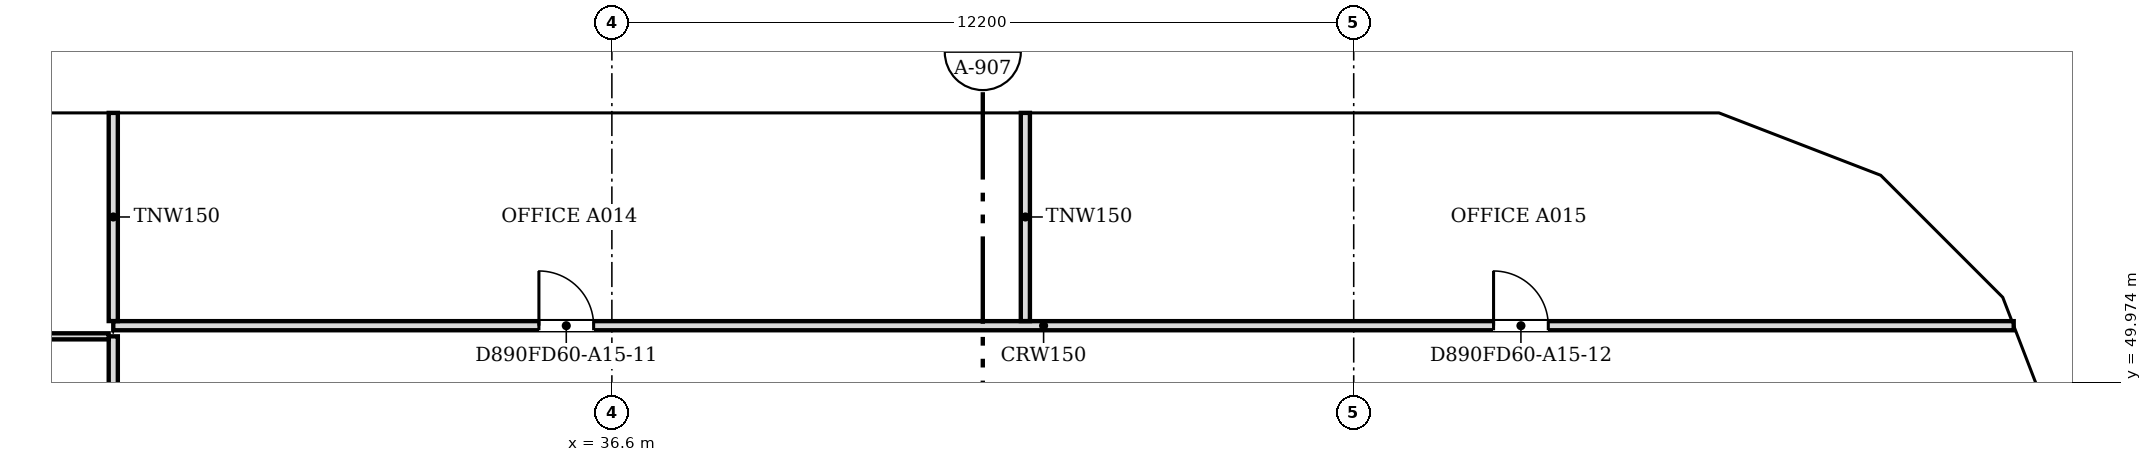
"""IFC4 building model, lengths in metres.
Left out: names, types, materials, properties, quantities, classifications, styles, units other than length and angle.
Written with IfcOpenShell. Run it as: python <this file> out.ifc"""

import sys

from ifc_helpers import new_model, si_unit, direction, frame, frame_2d, origin, place, context, subcontext, project, spatial, polyline, rectangle, outline, extrude, faceted_brep, source, transform, mapped, element, fill, save


model = new_model("IFC4")
c1 = context("Model", 3, precision=1e-05, world=origin(), true_north=direction((0.0, 1.0)))
c2 = subcontext(c1, "Body", "Model", "MODEL_VIEW")
j1 = project(units=[si_unit("LENGTHUNIT", "METRE"), si_unit("PLANEANGLEUNIT", "RADIAN")], contexts=[c1])
p1 = place(None, origin())
s1 = spatial("IfcSite", under=j1, at=p1, CompositionType="ELEMENT")
p2 = place(p1, origin())
s2 = spatial("IfcBuilding", under=s1, at=p2, CompositionType="ELEMENT")
p3 = place(p2, frame((0.0, 0.0, 170.6)))
s3 = spatial("IfcBuildingStorey", under=s2, at=p3, CompositionType="ELEMENT", Elevation=170.6)
m1 = source(origin(), c2, "Body", "Brep", [
    faceted_brep([(2.95, -0.25, 0.0), (3.003, -0.25, 0.068), (3.003, -0.25, 7.531), (2.95, -0.25, 7.6), (0.0, -0.25, 3.8), (0.047, 0.25, 3.86), (2.898, 0.25, 7.532), (2.898, 0.25, 0.068), (0.047, 0.25, 3.74), (2.95, 0.0, 0.0), (2.95, 0.0, 7.6), (0.0, 0.0, 3.8)], [[[0, 1, 2, 3, 4]], [[5, 6, 7, 8]], [[1, 0, 9]], [[10, 3, 2]], [[6, 5, 11, 4, 3, 10]], [[8, 7, 9, 0, 4, 11]], [[8, 11, 5]], [[1, 9, 7, 6, 10, 2]]]),
])
p4 = place(p3, frame((60.75, 48.753, -3.8), z_axis=(0.0, 0.0, 1.0), x_axis=(-0.35992665181, 0.932980602862, 0.0)))
e1 = element("IfcWall", 1, at=p4, inside=s3, PredefinedType="SOLIDWALL", context=c2, shape_type="MappedRepresentation", body=[
    mapped(m1, transform((0.0, 0.0, 0.0), scale=1.0)),
])
m2 = source(origin(), c2, "Body", "SweptSolid", [
    extrude(outline(polyline([(2.75, 6.935), (0.316, 3.8), (2.75, 0.665), (2.75, 6.935)])), frame((0.0, 0.26, 0.0), z_axis=(0.0, -1.0, 0.0), x_axis=(1.0, 0.0, 0.0)), (0.0, 0.0, 1.0), 0.52),
])
p5 = place(p4, origin())
e2 = element("IfcOpeningElement", 2, at=p5, cuts=e1, PredefinedType="OPENING", context=c2, shape_type="MappedRepresentation", body=[
    mapped(m2, transform((0.0, 0.0, 0.0), scale=1.0)),
])
m3 = source(origin(), c2, "Body", "Brep", [
    faceted_brep([(0.053, -0.25, 0.0), (2.997, -0.25, 3.8), (0.053, -0.25, 7.6), (0.0, -0.25, 7.532), (0.0, -0.25, 0.068), (0.106, 0.25, 7.531), (2.944, 0.25, 3.868), (2.944, 0.25, 3.732), (0.106, 0.25, 0.068), (2.997, 0.0, 3.8), (0.053, 0.0, 0.0), (0.053, 0.0, 7.6)], [[[0, 1, 2, 3, 4]], [[5, 6, 7, 8]], [[8, 7, 9, 1, 0, 10]], [[6, 5, 11, 2, 1, 9]], [[3, 2, 11]], [[10, 0, 4]], [[8, 10, 4, 3, 11, 5]], [[7, 6, 9]]]),
])
p6 = place(p3, frame((59.726, 51.469, -3.8), z_axis=(0.0, 0.0, 1.0), x_axis=(-0.707106781187, 0.707106781187, 0.0)))
e3 = element("IfcWall", 3, at=p6, inside=s3, PredefinedType="SOLIDWALL", context=c2, shape_type="MappedRepresentation", body=[
    mapped(m3, transform((0.0, 0.0, 0.0), scale=1.0)),
])
m4 = source(origin(), c2, "Body", "SweptSolid", [
    extrude(outline(polyline([(0.253, 0.666), (2.681, 3.8), (0.253, 6.934), (0.253, 0.666)])), frame((0.0, 0.26, 0.0), z_axis=(0.0, -1.0, 0.0), x_axis=(1.0, 0.0, 0.0)), (0.0, 0.0, 1.0), 0.52),
])
p7 = place(p6, origin())
e4 = element("IfcOpeningElement", 4, at=p7, cuts=e3, PredefinedType="OPENING", context=c2, shape_type="MappedRepresentation", body=[
    mapped(m4, transform((0.0, 0.0, 0.0), scale=1.0)),
])
m5 = source(origin(), c2, "Body", "Brep", [
    faceted_brep([(2.95, -0.25, 0.0), (2.997, -0.25, 0.059), (2.997, -0.25, 7.541), (2.95, -0.25, 7.6), (0.0, -0.25, 3.8), (0.053, 0.25, 3.868), (2.904, 0.25, 7.54), (2.904, 0.25, 0.06), (0.053, 0.25, 3.732), (2.95, 0.0, 0.0), (2.95, 0.0, 7.6), (0.0, 0.0, 3.8)], [[[0, 1, 2, 3, 4]], [[5, 6, 7, 8]], [[1, 0, 9]], [[10, 3, 2]], [[6, 5, 11, 4, 3, 10]], [[8, 7, 9, 0, 4, 11]], [[8, 11, 5]], [[1, 9, 7, 6, 10, 2]]]),
])
p8 = place(p3, frame((57.606, 53.588, -3.8), z_axis=(0.0, 0.0, 1.0), x_axis=(-0.932990326376, 0.359901446078, 0.0)))
e5 = element("IfcWall", 5, at=p8, inside=s3, PredefinedType="SOLIDWALL", context=c2, shape_type="MappedRepresentation", body=[
    mapped(m5, transform((0.0, 0.0, 0.0), scale=1.0)),
])
p9 = place(p8, origin())
e6 = element("IfcOpeningElement", 6, at=p9, cuts=e5, PredefinedType="OPENING", context=c2, shape_type="MappedRepresentation", body=[
    mapped(m2, transform((0.0, 0.0, 0.0), scale=1.0)),
])
m6 = source(origin(), c2, "Body", "Brep", [
    faceted_brep([(0.047, -0.25, 0.0), (3.05, -0.25, 3.8), (0.047, -0.25, 7.6), (0.0, -0.25, 7.54), (0.0, -0.25, 0.06), (0.093, 0.25, 7.541), (3.05, 0.25, 3.8), (0.093, 0.25, 0.059), (0.047, 0.0, 0.0), (0.047, 0.0, 7.6)], [[[0, 1, 2, 3, 4]], [[5, 6, 7]], [[7, 6, 1, 0, 8]], [[6, 5, 9, 2, 1]], [[3, 2, 9]], [[8, 0, 4]], [[7, 8, 4, 3, 9, 5]]]),
])
p10 = place(p3, frame((54.9, 54.65, -3.8), z_axis=(0.0, 0.0, 1.0), x_axis=(-1.0, 0.0, 0.0)))
e7 = element("IfcWall", 7, at=p10, inside=s3, PredefinedType="SOLIDWALL", context=c2, shape_type="MappedRepresentation", body=[
    mapped(m6, transform((0.0, 0.0, 0.0), scale=1.0)),
])
m7 = source(origin(), c2, "Body", "SweptSolid", [
    extrude(outline(polyline([(0.247, 0.656), (2.731, 3.8), (0.247, 6.944), (0.247, 0.656)])), frame((0.0, 0.26, 0.0), z_axis=(0.0, -1.0, 0.0), x_axis=(1.0, 0.0, 0.0)), (0.0, 0.0, 1.0), 0.52),
])
p11 = place(p10, origin())
e8 = element("IfcOpeningElement", 8, at=p11, cuts=e7, PredefinedType="OPENING", context=c2, shape_type="MappedRepresentation", body=[
    mapped(m7, transform((0.0, 0.0, 0.0), scale=1.0)),
])
m8 = source(origin(), c2, "Body", "SweptSolid", [
    extrude(outline(polyline([(3.05, 0.0), (6.1, 3.8), (3.05, 7.6), (0.0, 3.8), (3.05, 0.0)])), frame((0.0, 0.25, 0.0), z_axis=(0.0, -1.0, 0.0), x_axis=(1.0, 0.0, 0.0)), (0.0, 0.0, 1.0), 0.5),
])
p12 = place(p3, frame((51.85, 54.65, -3.8), z_axis=(0.0, 0.0, 1.0), x_axis=(-1.0, 0.0, 0.0)))
e9 = element("IfcWall", 9, at=p12, inside=s3, PredefinedType="SOLIDWALL", context=c2, shape_type="MappedRepresentation", body=[
    mapped(m8, transform((0.0, 0.0, 0.0), scale=1.0)),
])
m9 = source(origin(), c2, "Body", "SweptSolid", [
    extrude(outline(polyline([(3.05, 0.399), (5.78, 3.8), (3.05, 7.2), (0.321, 3.8), (3.05, 0.399)])), frame((0.0, 0.26, 0.0), z_axis=(0.0, -1.0, 0.0), x_axis=(1.0, 0.0, 0.0)), (0.0, 0.0, 1.0), 0.52),
])
p13 = place(p12, origin())
e10 = element("IfcOpeningElement", 10, at=p13, cuts=e9, PredefinedType="OPENING", context=c2, shape_type="MappedRepresentation", body=[
    mapped(m9, transform((0.0, 0.0, 0.0), scale=1.0)),
])
p14 = place(p3, frame((45.75, 54.65, -3.8), z_axis=(0.0, 0.0, 1.0), x_axis=(-1.0, 0.0, 0.0)))
e11 = element("IfcWall", 11, at=p14, inside=s3, PredefinedType="SOLIDWALL", context=c2, shape_type="MappedRepresentation", body=[
    mapped(m8, transform((0.0, 0.0, 0.0), scale=1.0)),
])
p15 = place(p14, origin())
e12 = element("IfcOpeningElement", 12, at=p15, cuts=e11, PredefinedType="OPENING", context=c2, shape_type="MappedRepresentation", body=[
    mapped(m9, transform((0.0, 0.0, 0.0), scale=1.0)),
])
m10 = source(origin(), c2, "Body", "Brep", [
    faceted_brep([(3.05, -0.25, 0.0), (6.1, -0.25, 3.8), (6.1, -0.25, 3.8), (3.05, -0.25, 7.6), (0.0, -0.25, 3.8), (0.0, 0.25, 3.8), (3.05, 0.25, 7.6), (6.1, 0.25, 3.8), (6.1, 0.25, 3.8), (3.05, 0.25, 0.0)], [[[0, 1, 2, 3, 4]], [[5, 6, 7, 8, 9]], [[9, 8, 1, 0]], [[7, 6, 3, 2]], [[6, 5, 4, 3]], [[5, 9, 0, 4]], [[1, 8, 7, 2]]]),
])
p16 = place(p3, frame((39.65, 54.65, -3.8), z_axis=(0.0, 0.0, 1.0), x_axis=(-1.0, 0.0, 0.0)))
e13 = element("IfcWall", 13, at=p16, inside=s3, PredefinedType="SOLIDWALL", context=c2, shape_type="MappedRepresentation", body=[
    mapped(m10, transform((0.0, 0.0, 0.0), scale=1.0)),
])
p17 = place(p16, origin())
e14 = element("IfcOpeningElement", 14, at=p17, cuts=e13, PredefinedType="OPENING", context=c2, shape_type="MappedRepresentation", body=[
    mapped(m9, transform((0.0, 0.0, 0.0), scale=1.0)),
])
p18 = place(p3, frame((33.55, 54.65, -3.8), z_axis=(0.0, 0.0, 1.0), x_axis=(-1.0, 0.0, 0.0)))
e15 = element("IfcWall", 15, at=p18, inside=s3, PredefinedType="SOLIDWALL", context=c2, shape_type="MappedRepresentation", body=[
    mapped(m8, transform((0.0, 0.0, 0.0), scale=1.0)),
])
p19 = place(p18, origin())
e16 = element("IfcOpeningElement", 16, at=p19, cuts=e15, PredefinedType="OPENING", context=c2, shape_type="MappedRepresentation", body=[
    mapped(m9, transform((0.0, 0.0, 0.0), scale=1.0)),
])
p20 = place(p3, frame((27.45, 54.65, -3.8), z_axis=(0.0, 0.0, 1.0), x_axis=(-1.0, 0.0, 0.0)))
e17 = element("IfcWall", 17, at=p20, inside=s3, PredefinedType="SOLIDWALL", context=c2, shape_type="MappedRepresentation", body=[
    mapped(m10, transform((0.0, 0.0, 0.0), scale=1.0)),
])
p21 = place(p20, origin())
e18 = element("IfcOpeningElement", 18, at=p21, cuts=e17, PredefinedType="OPENING", context=c2, shape_type="MappedRepresentation", body=[
    mapped(m9, transform((0.0, 0.0, 0.0), scale=1.0)),
])
p22 = place(p2, frame((0.0, 0.0, 174.4)))
s4 = spatial("IfcBuildingStorey", under=s2, at=p22, CompositionType="ELEMENT", Elevation=174.4)
m11 = source(origin(), c2, "Body", "Brep", [
    faceted_brep([(0.047, -0.25, 0.0), (2.997, -0.25, 3.8), (0.047, -0.25, 7.6), (0.0, -0.25, 7.541), (0.0, -0.25, 0.059), (0.093, 0.25, 7.54), (2.944, 0.25, 3.868), (2.944, 0.25, 3.732), (0.093, 0.25, 0.06), (2.997, 0.0, 3.8), (0.047, 0.0, 0.0), (0.047, 0.0, 7.6)], [[[0, 1, 2, 3, 4]], [[5, 6, 7, 8]], [[8, 7, 9, 1, 0, 10]], [[6, 5, 11, 2, 1, 9]], [[3, 2, 11]], [[10, 0, 4]], [[8, 10, 4, 3, 11, 5]], [[9, 7, 6]]]),
])
p23 = place(p22, frame((60.767, 48.71, -3.8), z_axis=(0.0, 0.0, 1.0), x_axis=(-0.359901446078, 0.932990326376, 0.0)))
e19 = element("IfcWall", 19, at=p23, inside=s4, PredefinedType="SOLIDWALL", context=c2, shape_type="MappedRepresentation", body=[
    mapped(m11, transform((0.0, 0.0, 0.0), scale=1.0)),
])
m12 = source(origin(), c2, "Body", "SweptSolid", [
    extrude(outline(polyline([(0.247, 0.665), (2.681, 3.8), (0.247, 6.935), (0.247, 0.665)])), frame((0.0, 0.26, 0.0), z_axis=(0.0, -1.0, 0.0), x_axis=(1.0, 0.0, 0.0)), (0.0, 0.0, 1.0), 0.52),
])
p24 = place(p23, origin())
e20 = element("IfcOpeningElement", 20, at=p24, cuts=e19, PredefinedType="OPENING", context=c2, shape_type="MappedRepresentation", body=[
    mapped(m12, transform((0.0, 0.0, 0.0), scale=1.0)),
])
m13 = source(origin(), c2, "Body", "Brep", [
    faceted_brep([(2.944, -0.25, 0.0), (2.997, -0.25, 0.068), (2.997, -0.25, 7.532), (2.944, -0.25, 7.6), (0.0, -0.25, 3.8), (0.053, 0.25, 3.868), (2.891, 0.25, 7.532), (2.891, 0.25, 0.068), (0.053, 0.25, 3.731), (2.944, 0.0, 0.0), (2.944, 0.0, 7.6), (0.0, 0.0, 3.8)], [[[0, 1, 2, 3, 4]], [[5, 6, 7, 8]], [[1, 0, 9]], [[10, 3, 2]], [[6, 5, 11, 4, 3, 10]], [[8, 7, 9, 0, 4, 11]], [[8, 11, 5]], [[1, 9, 7, 6, 10, 2]]]),
])
p25 = place(p22, frame((59.688, 51.506, -3.8), z_axis=(0.0, 0.0, 1.0), x_axis=(-0.707106781187, 0.707106781187, 0.0)))
e21 = element("IfcWall", 21, at=p25, inside=s4, PredefinedType="SOLIDWALL", context=c2, shape_type="MappedRepresentation", body=[
    mapped(m13, transform((0.0, 0.0, 0.0), scale=1.0)),
])
m14 = source(origin(), c2, "Body", "SweptSolid", [
    extrude(outline(polyline([(2.744, 6.934), (0.316, 3.8), (2.744, 0.666), (2.744, 6.934)])), frame((0.0, 0.26, 0.0), z_axis=(0.0, -1.0, 0.0), x_axis=(1.0, 0.0, 0.0)), (0.0, 0.0, 1.0), 0.52),
])
p26 = place(p25, origin())
e22 = element("IfcOpeningElement", 22, at=p26, cuts=e21, PredefinedType="OPENING", context=c2, shape_type="MappedRepresentation", body=[
    mapped(m14, transform((0.0, 0.0, 0.0), scale=1.0)),
])
m15 = source(origin(), c2, "Body", "Brep", [
    faceted_brep([(0.053, -0.25, 0.0), (3.003, -0.25, 3.8), (0.053, -0.25, 7.6), (0.0, -0.25, 7.531), (0.0, -0.25, 0.068), (0.106, 0.25, 7.532), (2.957, 0.25, 3.86), (2.957, 0.25, 3.74), (0.106, 0.25, 0.068), (3.003, 0.0, 3.8), (0.053, 0.0, 0.0), (0.053, 0.0, 7.6)], [[[0, 1, 2, 3, 4]], [[5, 6, 7, 8]], [[8, 7, 9, 1, 0, 10]], [[6, 5, 11, 2, 1, 9]], [[3, 2, 11]], [[10, 0, 4]], [[8, 10, 4, 3, 11, 5]], [[9, 7, 6]]]),
])
p27 = place(p22, frame((57.656, 53.569, -3.8), z_axis=(0.0, 0.0, 1.0), x_axis=(-0.933007896601, 0.359855894603, 0.0)))
e23 = element("IfcWall", 23, at=p27, inside=s4, PredefinedType="SOLIDWALL", context=c2, shape_type="MappedRepresentation", body=[
    mapped(m15, transform((0.0, 0.0, 0.0), scale=1.0)),
])
m16 = source(origin(), c2, "Body", "SweptSolid", [
    extrude(outline(polyline([(0.253, 0.665), (2.687, 3.8), (0.253, 6.935), (0.253, 0.665)])), frame((0.0, 0.26, 0.0), z_axis=(0.0, -1.0, 0.0), x_axis=(1.0, 0.0, 0.0)), (0.0, 0.0, 1.0), 0.52),
])
p28 = place(p27, origin())
e24 = element("IfcOpeningElement", 24, at=p28, cuts=e23, PredefinedType="OPENING", context=c2, shape_type="MappedRepresentation", body=[
    mapped(m16, transform((0.0, 0.0, 0.0), scale=1.0)),
])
m17 = source(origin(), c2, "Body", "Brep", [
    faceted_brep([(3.003, -0.25, 0.0), (6.053, -0.25, 3.8), (3.003, -0.25, 7.6), (0.0, -0.25, 3.8), (0.047, 0.25, 3.859), (3.003, 0.25, 7.6), (6.053, 0.25, 3.8), (3.003, 0.25, 0.0), (0.047, 0.25, 3.741), (0.0, 0.0, 3.8)], [[[0, 1, 2, 3]], [[4, 5, 6, 7, 8]], [[7, 6, 1, 0]], [[6, 5, 2, 1]], [[5, 4, 9, 3, 2]], [[8, 7, 0, 3, 9]], [[8, 9, 4]]]),
])
p29 = place(p22, frame((54.854, 54.65, -3.8), z_axis=(0.0, 0.0, 1.0), x_axis=(-1.0, 0.0, 0.0)))
e25 = element("IfcWall", 25, at=p29, inside=s4, PredefinedType="SOLIDWALL", context=c2, shape_type="MappedRepresentation", body=[
    mapped(m17, transform((0.0, 0.0, 0.0), scale=1.0)),
])
m18 = source(origin(), c2, "Body", "SweptSolid", [
    extrude(outline(polyline([(3.005, 0.401), (5.733, 3.8), (3.005, 7.199), (0.319, 3.8), (3.005, 0.401)])), frame((0.0, 0.26, 0.0), z_axis=(0.0, -1.0, 0.0), x_axis=(1.0, 0.0, 0.0)), (0.0, 0.0, 1.0), 0.52),
])
p30 = place(p29, origin())
e26 = element("IfcOpeningElement", 26, at=p30, cuts=e25, PredefinedType="OPENING", context=c2, shape_type="MappedRepresentation", body=[
    mapped(m18, transform((0.0, 0.0, 0.0), scale=1.0)),
])
m19 = source(origin(), c2, "Body", "SweptSolid", [
    extrude(outline(polyline([(3.05, 0.0), (6.1, 3.8), (3.05, 7.6), (0.0, 3.8), (3.05, 0.0)])), frame((0.0, 0.25, 0.0), z_axis=(0.0, -1.0, 0.0), x_axis=(1.0, 0.0, 0.0)), (0.0, 0.0, 1.0), 0.5),
])
p31 = place(p22, frame((48.8, 54.65, -3.8), z_axis=(0.0, 0.0, 1.0), x_axis=(-1.0, 0.0, 0.0)))
e27 = element("IfcWall", 27, at=p31, inside=s4, PredefinedType="SOLIDWALL", context=c2, shape_type="MappedRepresentation", body=[
    mapped(m19, transform((0.0, 0.0, 0.0), scale=1.0)),
])
m20 = source(origin(), c2, "Body", "SweptSolid", [
    extrude(outline(polyline([(3.05, 0.399), (5.78, 3.8), (3.05, 7.2), (0.321, 3.8), (3.05, 0.399)])), frame((0.0, 0.26, 0.0), z_axis=(0.0, -1.0, 0.0), x_axis=(1.0, 0.0, 0.0)), (0.0, 0.0, 1.0), 0.52),
])
p32 = place(p31, origin())
e28 = element("IfcOpeningElement", 28, at=p32, cuts=e27, PredefinedType="OPENING", context=c2, shape_type="MappedRepresentation", body=[
    mapped(m20, transform((0.0, 0.0, 0.0), scale=1.0)),
])
m21 = source(origin(), c2, "Body", "Brep", [
    faceted_brep([(3.05, -0.25, 0.0), (6.1, -0.25, 3.8), (6.1, -0.25, 3.8), (3.05, -0.25, 7.6), (0.0, -0.25, 3.8), (0.0, 0.25, 3.8), (3.05, 0.25, 7.6), (6.1, 0.25, 3.8), (6.1, 0.25, 3.8), (3.05, 0.25, 0.0)], [[[0, 1, 2, 3, 4]], [[5, 6, 7, 8, 9]], [[9, 8, 1, 0]], [[7, 6, 3, 2]], [[6, 5, 4, 3]], [[5, 9, 0, 4]], [[1, 8, 7, 2]]]),
])
p33 = place(p22, frame((42.7, 54.65, -3.8), z_axis=(0.0, 0.0, 1.0), x_axis=(-1.0, 0.0, 0.0)))
e29 = element("IfcWall", 29, at=p33, inside=s4, PredefinedType="SOLIDWALL", context=c2, shape_type="MappedRepresentation", body=[
    mapped(m21, transform((0.0, 0.0, 0.0), scale=1.0)),
])
p34 = place(p33, origin())
e30 = element("IfcOpeningElement", 30, at=p34, cuts=e29, PredefinedType="OPENING", context=c2, shape_type="MappedRepresentation", body=[
    mapped(m20, transform((0.0, 0.0, 0.0), scale=1.0)),
])
p35 = place(p22, frame((36.6, 54.65, -3.8), z_axis=(0.0, 0.0, 1.0), x_axis=(-1.0, 0.0, 0.0)))
e31 = element("IfcWall", 31, at=p35, inside=s4, PredefinedType="SOLIDWALL", context=c2, shape_type="MappedRepresentation", body=[
    mapped(m19, transform((0.0, 0.0, 0.0), scale=1.0)),
])
p36 = place(p35, origin())
e32 = element("IfcOpeningElement", 32, at=p36, cuts=e31, PredefinedType="OPENING", context=c2, shape_type="MappedRepresentation", body=[
    mapped(m20, transform((0.0, 0.0, 0.0), scale=1.0)),
])
p37 = place(p22, frame((30.5, 54.65, -3.8), z_axis=(0.0, 0.0, 1.0), x_axis=(-1.0, 0.0, 0.0)))
e33 = element("IfcWall", 33, at=p37, inside=s4, PredefinedType="SOLIDWALL", context=c2, shape_type="MappedRepresentation", body=[
    mapped(m19, transform((0.0, 0.0, 0.0), scale=1.0)),
])
p38 = place(p37, origin())
e34 = element("IfcOpeningElement", 34, at=p38, cuts=e33, PredefinedType="OPENING", context=c2, shape_type="MappedRepresentation", body=[
    mapped(m20, transform((0.0, 0.0, 0.0), scale=1.0)),
])
p39 = place(p3, frame((28.4, 48.176, 0.0), z_axis=(0.0, 0.0, 1.0), x_axis=(0.0, 1.0, 0.0)))
e35 = element("IfcWall", 35, at=p39, inside=s3, PredefinedType="PARTITIONING", context=c2, shape_type="SweptSolid", body=[
    extrude(rectangle(XDim=2.549, YDim=0.15, at=frame_2d((1.274, 0.0))), origin(), (0.0, 0.0, 1.0), 3.067),
])
p40 = place(p3, frame((19.776, 50.725, 0.0), z_axis=(0.0, 0.0, 1.0), x_axis=(1.0, 0.0, 0.0)))
e36 = element("IfcWall", 36, at=p40, inside=s3, PredefinedType="PARTITIONING", context=c2, shape_type="SweptSolid", body=[
    extrude(rectangle(XDim=8.548, YDim=0.1, at=frame_2d((4.274, 0.0))), origin(), (0.0, 0.0, 1.0), 3.067),
])
m22 = source(origin(), c2, "Body", "SweptSolid", [
    extrude(rectangle(XDim=0.9, YDim=2.1, at=frame_2d((0.45, 1.05))), frame((0.0, 0.06, 0.0), z_axis=(0.0, -1.0, 0.0), x_axis=(1.0, 0.0, 0.0)), (0.0, 0.0, 1.0), 0.12),
])
p41 = place(p40, frame((1.6, 0.0, 0.0)))
e37 = element("IfcOpeningElement", 37, at=p41, cuts=e36, PredefinedType="OPENING", context=c2, shape_type="MappedRepresentation", body=[
    mapped(m22, transform((0.0, 0.0, 0.0), scale=1.0)),
])
p42 = place(p40, frame((5.927, 0.0, 0.0)))
e38 = element("IfcOpeningElement", 38, at=p42, cuts=e36, PredefinedType="OPENING", context=c2, shape_type="MappedRepresentation", body=[
    mapped(m22, transform((0.0, 0.0, 0.0), scale=1.0)),
])
p43 = place(p3, frame((28.4, 50.9, 0.0), z_axis=(0.0, 0.0, 1.0), x_axis=(1.0, 0.0, 0.0)))
e39 = element("IfcWall", 39, at=p43, inside=s3, PredefinedType="PARTITIONING", context=c2, shape_type="SweptSolid", body=[
    extrude(rectangle(XDim=31.254, YDim=0.15, at=frame_2d((15.627, 0.0))), origin(), (0.0, 0.0, 1.0), 3.067),
])
m23 = source(origin(), c2, "Body", "SweptSolid", [
    extrude(rectangle(XDim=0.9, YDim=2.1, at=frame_2d((0.45, 1.05))), frame((0.0, 0.085, 0.0), z_axis=(0.0, -1.0, 0.0), x_axis=(1.0, 0.0, 0.0)), (0.0, 0.0, 1.0), 0.17),
])
p44 = place(p43, frame((7.0, 0.0, 0.0)))
e40 = element("IfcOpeningElement", 40, at=p44, cuts=e39, PredefinedType="OPENING", context=c2, shape_type="MappedRepresentation", body=[
    mapped(m23, transform((0.0, 0.0, 0.0), scale=1.0)),
])
p45 = place(p43, frame((22.7, 0.0, 0.0)))
e41 = element("IfcOpeningElement", 41, at=p45, cuts=e39, PredefinedType="OPENING", context=c2, shape_type="MappedRepresentation", body=[
    mapped(m23, transform((0.0, 0.0, 0.0), scale=1.0)),
])
for number, where, z_axis, x_axis in (
    (42, (28.4, 50.976, 0.0), (0.0, 0.0, 1.0), (0.0, 1.0, 0.0)),
    (43, (43.4, 50.976, 0.0), (0.0, 0.0, 1.0), (0.0, 1.0, 0.0)),
):
    element("IfcWall", number, at=place(p3, frame(where, z_axis=z_axis, x_axis=x_axis)), inside=s3, PredefinedType="PARTITIONING", context=c2, shape_type="SweptSolid", body=[
        extrude(rectangle(XDim=3.424, YDim=0.15, at=frame_2d((1.712, 0.0))), origin(), (0.0, 0.0, 1.0), 3.067),
    ])
m24 = source(origin(), c2, "Body", "SweptSolid", [
    extrude(rectangle(XDim=0.9, YDim=2.1, at=frame_2d((0.45, 1.05))), frame((0.0, 0.025, 0.0), z_axis=(0.0, -1.0, 0.0), x_axis=(1.0, 0.0, 0.0)), (0.0, 0.0, 1.0), 0.05),
])
p46 = place(p44, origin())
e44 = element("IfcDoor", 44, at=p46, inside=s3, OperationType="SINGLE_SWING_LEFT", PredefinedType="DOOR", context=c2, shape_type="MappedRepresentation", body=[
    mapped(m24, transform((0.0, 0.0, 0.0), scale=1.0)),
])
fill(e40, e44)
p47 = place(p45, origin())
e45 = element("IfcDoor", 45, at=p47, inside=s3, OperationType="SINGLE_SWING_LEFT", PredefinedType="DOOR", context=c2, shape_type="MappedRepresentation", body=[
    mapped(m24, transform((0.0, 0.0, 0.0), scale=1.0)),
])
fill(e41, e45)
save(model, sys.argv[1])
